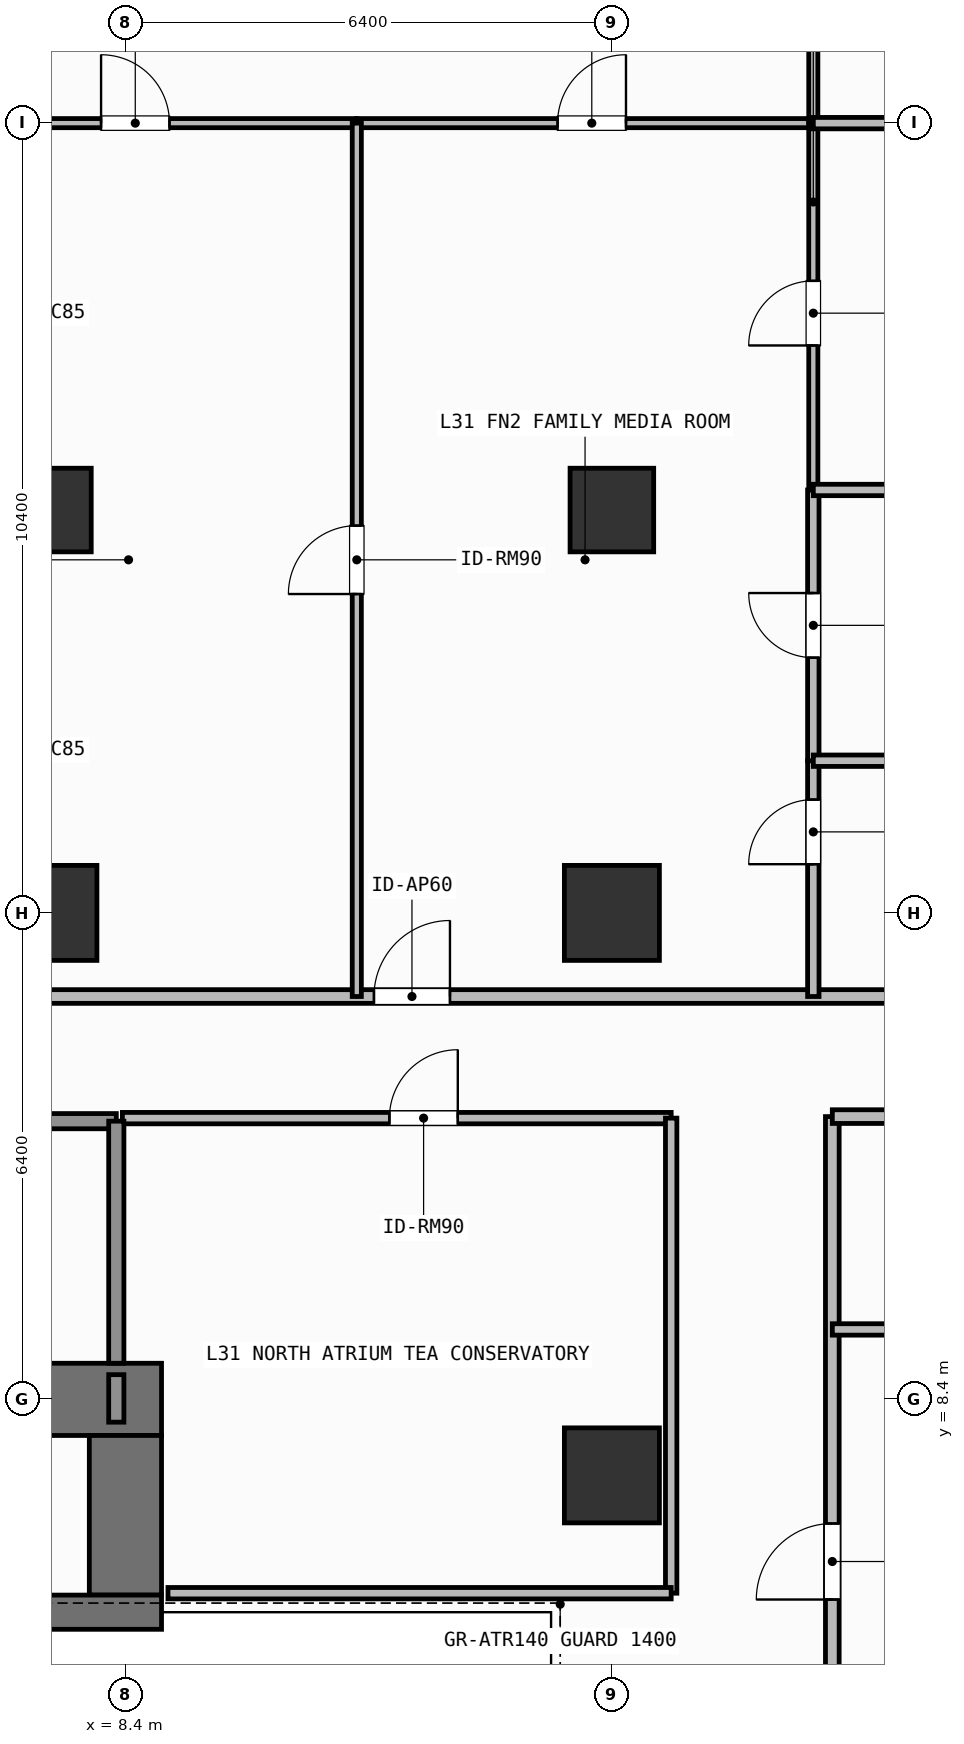
"""IFC4 building model, lengths in metres.
Left out: names, types, materials, properties, quantities, classifications, styles, units other than length and angle.
Written with IfcOpenShell. Run it as: python <this file> out.ifc"""

import sys

from ifc_helpers import new_model, si_unit, direction, frame, frame_2d, origin, origin_2d, place, context, subcontext, project, spatial, rectangle, extrude, element, fill, save


model = new_model("IFC4")
c1 = context("Model", 3, precision=1e-05, world=origin(), true_north=direction((0.0, 1.0)))
c2 = subcontext(c1, "Body", "Model", "MODEL_VIEW")
j1 = project(units=[si_unit("LENGTHUNIT", "METRE"), si_unit("PLANEANGLEUNIT", "RADIAN")], contexts=[c1])
p1 = place(None, origin())
s1 = spatial("IfcSite", under=j1, at=p1, CompositionType="ELEMENT")
p2 = place(p1, origin())
s2 = spatial("IfcBuilding", under=s1, at=p2, CompositionType="ELEMENT")
p3 = place(p2, frame((0.0, 0.0, 125.1)))
s3 = spatial("IfcBuildingStorey", under=s2, at=p3, CompositionType="ELEMENT", Elevation=125.1)
p4 = place(p3, frame((-7.55, 8.4, 0.0), z_axis=(0.0, 0.0, 1.0), x_axis=(1.0, 0.0, 0.0)))
e1 = element("IfcWall", 1, at=p4, inside=s3, PredefinedType="SHEAR", context=c2, shape_type="SweptSolid", body=[
    extrude(rectangle(XDim=16.425, YDim=0.95, at=frame_2d((8.212, 0.0))), origin(), (0.0, 0.0, 1.0), 3.9),
])
p5 = place(p3, frame((8.4, 5.825, 0.0), z_axis=(0.0, 0.0, 1.0), x_axis=(0.0, 1.0, 0.0)))
e2 = element("IfcWall", 2, at=p5, inside=s3, PredefinedType="SHEAR", context=c2, shape_type="SweptSolid", body=[
    extrude(rectangle(XDim=2.1, YDim=0.95, at=frame_2d((1.05, 0.0))), origin(), (0.0, 0.0, 1.0), 3.9),
])
p6 = place(p3, frame((3.045, 5.6, 0.0), z_axis=(0.0, 0.0, 1.0), x_axis=(1.0, 0.0, 0.0)))
e3 = element("IfcWall", 3, at=p6, inside=s3, PredefinedType="SHEAR", context=c2, shape_type="SweptSolid", body=[
    extrude(rectangle(XDim=5.83, YDim=0.45, at=frame_2d((2.915, 0.0))), origin(), (0.0, 0.0, 1.0), 3.9),
])
for number, where, z_axis, x_axis in (
    (4, (7.4, 14.8, 0.0), (0.0, 0.0, 1.0), (1.0, 0.0, 0.0)),
    (5, (14.8, 14.8, 0.0), (0.0, 0.0, 1.0), (1.0, 0.0, 0.0)),
    (6, (14.8, 7.4, 0.0), (0.0, 0.0, 1.0), (1.0, 0.0, 0.0)),
):
    element("IfcColumn", number, at=place(p3, frame(where, z_axis=z_axis, x_axis=x_axis)), inside=s3, PredefinedType="COLUMN", context=c2, shape_type="SweptSolid", body=[
        extrude(rectangle(XDim=1.25, YDim=1.25, at=origin_2d()), origin(), (0.0, 0.0, 1.0), 3.9),
    ])
for number, where, z_axis, x_axis in (
    (7, (7.4, 20.1, 0.0), (0.0, 0.0, 1.0), (1.0, 0.0, 0.0)),
    (8, (14.8, 20.1, 0.0), (0.0, 0.0, 1.0), (1.0, 0.0, 0.0)),
):
    element("IfcColumn", number, at=place(p3, frame(where, z_axis=z_axis, x_axis=x_axis)), inside=s3, PredefinedType="COLUMN", context=c2, shape_type="SweptSolid", body=[
        extrude(rectangle(XDim=1.1, YDim=1.1, at=origin_2d()), origin(), (0.0, 0.0, 1.0), 3.9),
    ])
p7 = place(p3, frame((4.58, 12.06, 0.0), z_axis=(0.0, 0.0, 1.0), x_axis=(1.0, 0.0, 0.0)))
e9 = element("IfcWall", 9, at=p7, inside=s3, PredefinedType="SOLIDWALL", context=c2, shape_type="SweptSolid", body=[
    extrude(rectangle(XDim=3.7, YDim=0.2, at=frame_2d((1.85, 0.0))), origin(), (0.0, 0.0, 1.0), 3.68),
])
p8 = place(p7, frame((1.212, 0.0, 0.0)))
e10 = element("IfcOpeningElement", 10, at=p8, cuts=e9, PredefinedType="OPENING", context=c2, shape_type="SweptSolid", body=[
    extrude(rectangle(XDim=1.1, YDim=2.15, at=frame_2d((0.55, 1.075))), frame((0.0, 0.11, 0.0), z_axis=(0.0, -1.0, 0.0), x_axis=(1.0, 0.0, 0.0)), (0.0, 0.0, 1.0), 0.22),
])
p9 = place(p3, frame((8.36, 12.1, 0.0), z_axis=(0.0, 0.0, 1.0), x_axis=(1.0, 0.0, 0.0)))
e11 = element("IfcWall", 11, at=p9, inside=s3, PredefinedType="PARTITIONING", context=c2, shape_type="SweptSolid", body=[
    extrude(rectangle(XDim=7.22, YDim=0.15, at=frame_2d((3.61, 0.0))), origin(), (0.0, 0.0, 1.0), 3.68),
])
p10 = place(p9, frame((3.513, 0.0, 0.0)))
e12 = element("IfcOpeningElement", 12, at=p10, cuts=e11, PredefinedType="OPENING", context=c2, shape_type="SweptSolid", body=[
    extrude(rectangle(XDim=0.9, YDim=2.1, at=frame_2d((0.45, 1.05))), frame((0.0, 0.085, 0.0), z_axis=(0.0, -1.0, 0.0), x_axis=(1.0, 0.0, 0.0)), (0.0, 0.0, 1.0), 0.17),
])
p11 = place(p3, frame((1.474, 13.7, 0.0), z_axis=(0.0, 0.0, 1.0), x_axis=(1.0, 0.0, 0.0)))
e13 = element("IfcWall", 13, at=p11, inside=s3, PredefinedType="PARTITIONING", context=c2, shape_type="SweptSolid", body=[
    extrude(rectangle(XDim=22.646, YDim=0.18, at=frame_2d((11.323, 0.0))), origin(), (0.0, 0.0, 1.0), 3.68),
])
p12 = place(p11, frame((10.196, 0.0, 0.0)))
e14 = element("IfcOpeningElement", 14, at=p12, cuts=e13, PredefinedType="OPENING", context=c2, shape_type="SweptSolid", body=[
    extrude(rectangle(XDim=1.0, YDim=2.2, at=frame_2d((0.5, 1.1))), frame((0.0, 0.1, 0.0), z_axis=(0.0, -1.0, 0.0), x_axis=(1.0, 0.0, 0.0)), (0.0, 0.0, 1.0), 0.2),
])
p13 = place(p3, frame((5.438, 25.19, 0.0), z_axis=(0.0, 0.0, 1.0), x_axis=(1.0, 0.0, 0.0)))
e15 = element("IfcWall", 15, at=p13, inside=s3, PredefinedType="PARTITIONING", context=c2, shape_type="SweptSolid", body=[
    extrude(rectangle(XDim=6.006, YDim=0.12, at=frame_2d((3.003, 0.0))), origin(), (0.0, 0.0, 1.0), 3.68),
])
p14 = place(p13, frame((2.642, 0.0, 0.0)))
e16 = element("IfcOpeningElement", 16, at=p14, cuts=e15, PredefinedType="OPENING", context=c2, shape_type="SweptSolid", body=[
    extrude(rectangle(XDim=0.9, YDim=2.1, at=frame_2d((0.45, 1.05))), frame((0.0, 0.07, 0.0), z_axis=(0.0, -1.0, 0.0), x_axis=(1.0, 0.0, 0.0)), (0.0, 0.0, 1.0), 0.14),
])
p15 = place(p3, frame((11.444, 25.19, 0.0), z_axis=(0.0, 0.0, 1.0), x_axis=(1.0, 0.0, 0.0)))
e17 = element("IfcWall", 17, at=p15, inside=s3, PredefinedType="PARTITIONING", context=c2, shape_type="SweptSolid", body=[
    extrude(rectangle(XDim=6.006, YDim=0.12, at=frame_2d((3.003, 0.0))), origin(), (0.0, 0.0, 1.0), 3.68),
])
p16 = place(p15, frame((2.642, 0.0, 0.0)))
e18 = element("IfcOpeningElement", 18, at=p16, cuts=e17, PredefinedType="OPENING", context=c2, shape_type="SweptSolid", body=[
    extrude(rectangle(XDim=0.9, YDim=2.1, at=frame_2d((0.45, 1.05))), frame((0.0, 0.07, 0.0), z_axis=(0.0, -1.0, 0.0), x_axis=(1.0, 0.0, 0.0)), (0.0, 0.0, 1.0), 0.14),
])
p17 = place(p3, frame((11.444, 13.7, 0.0), z_axis=(0.0, 0.0, 1.0), x_axis=(0.0, 1.0, 0.0)))
e19 = element("IfcWall", 19, at=p17, inside=s3, PredefinedType="PARTITIONING", context=c2, shape_type="SweptSolid", body=[
    extrude(rectangle(XDim=11.49, YDim=0.12, at=frame_2d((5.745, 0.0))), origin(), (0.0, 0.0, 1.0), 3.68),
])
p18 = place(p17, frame((5.295, 0.0, 0.0)))
e20 = element("IfcOpeningElement", 20, at=p18, cuts=e19, PredefinedType="OPENING", context=c2, shape_type="SweptSolid", body=[
    extrude(rectangle(XDim=0.9, YDim=2.1, at=frame_2d((0.45, 1.05))), frame((0.0, 0.07, 0.0), z_axis=(0.0, -1.0, 0.0), x_axis=(1.0, 0.0, 0.0)), (0.0, 0.0, 1.0), 0.14),
])
p19 = place(p3, frame((17.45, 13.7, 0.0), z_axis=(0.0, 0.0, 1.0), x_axis=(0.0, 1.0, 0.0)))
e21 = element("IfcWall", 21, at=p19, inside=s3, PredefinedType="PARTITIONING", context=c2, shape_type="SweptSolid", body=[
    extrude(rectangle(XDim=3.102, YDim=0.15, at=frame_2d((1.551, 0.0))), origin(), (0.0, 0.0, 1.0), 3.68),
])
p20 = place(p19, frame((1.741, 0.0, 0.0)))
e22 = element("IfcOpeningElement", 22, at=p20, cuts=e21, PredefinedType="OPENING", context=c2, shape_type="SweptSolid", body=[
    extrude(rectangle(XDim=0.85, YDim=2.1, at=frame_2d((0.425, 1.05))), frame((0.0, 0.085, 0.0), z_axis=(0.0, -1.0, 0.0), x_axis=(1.0, 0.0, 0.0)), (0.0, 0.0, 1.0), 0.17),
])
p21 = place(p3, frame((17.45, 16.802, 0.0), z_axis=(0.0, 0.0, 1.0), x_axis=(0.0, 1.0, 0.0)))
e23 = element("IfcWall", 23, at=p21, inside=s3, PredefinedType="PARTITIONING", context=c2, shape_type="SweptSolid", body=[
    extrude(rectangle(XDim=3.562, YDim=0.15, at=frame_2d((1.781, 0.0))), origin(), (0.0, 0.0, 1.0), 3.68),
])
p22 = place(p21, frame((1.356, 0.0, 0.0)))
e24 = element("IfcOpeningElement", 24, at=p22, cuts=e23, PredefinedType="OPENING", context=c2, shape_type="SweptSolid", body=[
    extrude(rectangle(XDim=0.85, YDim=2.1, at=frame_2d((0.425, 1.05))), frame((0.0, 0.085, 0.0), z_axis=(0.0, -1.0, 0.0), x_axis=(1.0, 0.0, 0.0)), (0.0, 0.0, 1.0), 0.17),
])
p23 = place(p3, frame((17.45, 20.364, 0.0), z_axis=(0.0, 0.0, 1.0), x_axis=(0.0, 1.0, 0.0)))
e25 = element("IfcWall", 25, at=p23, inside=s3, PredefinedType="PARTITIONING", context=c2, shape_type="SweptSolid", body=[
    extrude(rectangle(XDim=4.826, YDim=0.12, at=frame_2d((2.413, 0.0))), origin(), (0.0, 0.0, 1.0), 3.68),
])
p24 = place(p23, frame((1.901, 0.0, 0.0)))
e26 = element("IfcOpeningElement", 26, at=p24, cuts=e25, PredefinedType="OPENING", context=c2, shape_type="SweptSolid", body=[
    extrude(rectangle(XDim=0.85, YDim=2.1, at=frame_2d((0.425, 1.05))), frame((0.0, 0.07, 0.0), z_axis=(0.0, -1.0, 0.0), x_axis=(1.0, 0.0, 0.0)), (0.0, 0.0, 1.0), 0.14),
])
p25 = place(p3, frame((17.45, 25.19, 0.0), z_axis=(0.0, 0.0, 1.0), x_axis=(0.0, 1.0, 0.0)))
e27 = element("IfcWall", 27, at=p25, inside=s3, PredefinedType="PARTITIONING", context=c2, shape_type="SweptSolid", body=[
    extrude(rectangle(XDim=4.24, YDim=0.12, at=frame_2d((2.12, 0.0))), origin(), (0.0, 0.0, 1.0), 3.68),
])
p26 = place(p25, frame((1.581, 0.0, 0.0)))
e28 = element("IfcOpeningElement", 28, at=p26, cuts=e27, PredefinedType="OPENING", context=c2, shape_type="SweptSolid", body=[
    extrude(rectangle(XDim=0.9, YDim=2.1, at=frame_2d((0.45, 1.05))), frame((0.0, 0.07, 0.0), z_axis=(0.0, -1.0, 0.0), x_axis=(1.0, 0.0, 0.0)), (0.0, 0.0, 1.0), 0.14),
])
p27 = place(p3, frame((17.7, 1.309, 0.0), z_axis=(0.0, 0.0, 1.0), x_axis=(0.0, 1.0, 0.0)))
e29 = element("IfcWall", 29, at=p27, inside=s3, PredefinedType="PARTITIONING", context=c2, shape_type="SweptSolid", body=[
    extrude(rectangle(XDim=10.811, YDim=0.18, at=frame_2d((5.406, 0.0))), origin(), (0.0, 0.0, 1.0), 3.68),
])
p28 = place(p27, frame((4.458, 0.0, 0.0)))
e30 = element("IfcOpeningElement", 30, at=p28, cuts=e29, PredefinedType="OPENING", context=c2, shape_type="SweptSolid", body=[
    extrude(rectangle(XDim=1.0, YDim=2.2, at=frame_2d((0.5, 1.1))), frame((0.0, 0.1, 0.0), z_axis=(0.0, -1.0, 0.0), x_axis=(1.0, 0.0, 0.0)), (0.0, 0.0, 1.0), 0.2),
])
p29 = place(p3, frame((17.7, 9.32, 0.0), z_axis=(0.0, 0.0, 1.0), x_axis=(1.0, 0.0, 0.0)))
e31 = element("IfcWall", 31, at=p29, inside=s3, PredefinedType="PARTITIONING", context=c2, shape_type="SweptSolid", body=[
    extrude(rectangle(XDim=5.59, YDim=0.15, at=frame_2d((2.795, 0.0))), origin(), (0.0, 0.0, 1.0), 3.68),
])
p30 = place(p29, frame((2.458, 0.0, 0.0)))
e32 = element("IfcOpeningElement", 32, at=p30, cuts=e31, PredefinedType="OPENING", context=c2, shape_type="SweptSolid", body=[
    extrude(rectangle(XDim=0.85, YDim=2.1, at=frame_2d((0.425, 1.05))), frame((0.0, 0.085, 0.0), z_axis=(0.0, -1.0, 0.0), x_axis=(1.0, 0.0, 0.0)), (0.0, 0.0, 1.0), 0.17),
])
p31 = place(p3, frame((8.28, 8.875, 0.0), z_axis=(0.0, 0.0, 1.0), x_axis=(0.0, 1.0, 0.0)))
e33 = element("IfcWall", 33, at=p31, inside=s3, PredefinedType="SOLIDWALL", context=c2, shape_type="SweptSolid", body=[
    extrude(rectangle(XDim=3.185, YDim=0.2, at=frame_2d((1.593, 0.0))), origin(), (0.0, 0.0, 1.0), 3.68),
])
p32 = place(p3, frame((8.28, 8.1, 0.0), z_axis=(0.0, 0.0, 1.0), x_axis=(0.0, 1.0, 0.0)))
e34 = element("IfcWall", 34, at=p32, inside=s3, PredefinedType="SOLIDWALL", context=c2, shape_type="SweptSolid", body=[
    extrude(rectangle(XDim=0.625, YDim=0.2, at=frame_2d((0.312, 0.0))), origin(), (0.0, 0.0, 1.0), 3.68),
])
p33 = place(p3, frame((15.58, 5.85, 0.0), z_axis=(0.0, 0.0, 1.0), x_axis=(0.0, 1.0, 0.0)))
e35 = element("IfcWall", 35, at=p33, inside=s3, PredefinedType="PARTITIONING", context=c2, shape_type="SweptSolid", body=[
    extrude(rectangle(XDim=6.25, YDim=0.15, at=frame_2d((3.125, 0.0))), origin(), (0.0, 0.0, 1.0), 3.68),
])
p34 = place(p3, frame((8.96, 5.85, 0.0), z_axis=(0.0, 0.0, 1.0), x_axis=(1.0, 0.0, 0.0)))
e36 = element("IfcWall", 36, at=p34, inside=s3, PredefinedType="PARTITIONING", context=c2, shape_type="SweptSolid", body=[
    extrude(rectangle(XDim=6.62, YDim=0.15, at=frame_2d((3.31, 0.0))), origin(), (0.0, 0.0, 1.0), 3.68),
])
for number, where, z_axis, x_axis in (
    (37, (17.45, 16.802, 0.0), (0.0, 0.0, 1.0), (1.0, 0.0, 0.0)),
    (38, (17.45, 20.364, 0.0), (0.0, 0.0, 1.0), (1.0, 0.0, 0.0)),
    (39, (17.45, 25.19, 0.0), (0.0, 0.0, 1.0), (1.0, 0.0, 0.0)),
):
    element("IfcWall", number, at=place(p3, frame(where, z_axis=z_axis, x_axis=x_axis)), inside=s3, PredefinedType="PARTITIONING", context=c2, shape_type="SweptSolid", body=[
        extrude(rectangle(XDim=6.67, YDim=0.15, at=frame_2d((3.335, 0.0))), origin(), (0.0, 0.0, 1.0), 3.68),
    ])
p35 = place(p3, frame((17.7, 12.12, 0.0), z_axis=(0.0, 0.0, 1.0), x_axis=(1.0, 0.0, 0.0)))
e40 = element("IfcWall", 40, at=p35, inside=s3, PredefinedType="PARTITIONING", context=c2, shape_type="SweptSolid", body=[
    extrude(rectangle(XDim=9.83, YDim=0.18, at=frame_2d((4.915, 0.0))), origin(), (0.0, 0.0, 1.0), 3.68),
])
p36 = place(p10, origin())
e41 = element("IfcDoor", 41, at=p36, inside=s3, OperationType="SINGLE_SWING_RIGHT", PredefinedType="DOOR", context=c2, shape_type="SweptSolid", body=[
    extrude(rectangle(XDim=0.9, YDim=2.1, at=frame_2d((0.45, 1.05))), frame((0.0, 0.025, 0.0), z_axis=(0.0, -1.0, 0.0), x_axis=(1.0, 0.0, 0.0)), (0.0, 0.0, 1.0), 0.05),
])
fill(e12, e41)
p37 = place(p12, origin())
e42 = element("IfcDoor", 42, at=p37, inside=s3, OperationType="SINGLE_SWING_RIGHT", PredefinedType="DOOR", context=c2, shape_type="SweptSolid", body=[
    extrude(rectangle(XDim=1.0, YDim=2.2, at=frame_2d((0.5, 1.1))), frame((0.0, 0.025, 0.0), z_axis=(0.0, -1.0, 0.0), x_axis=(1.0, 0.0, 0.0)), (0.0, 0.0, 1.0), 0.05),
])
fill(e14, e42)
p38 = place(p14, origin())
e43 = element("IfcDoor", 43, at=p38, inside=s3, OperationType="SINGLE_SWING_LEFT", PredefinedType="DOOR", context=c2, shape_type="SweptSolid", body=[
    extrude(rectangle(XDim=0.9, YDim=2.1, at=frame_2d((0.45, 1.05))), frame((0.0, 0.025, 0.0), z_axis=(0.0, -1.0, 0.0), x_axis=(1.0, 0.0, 0.0)), (0.0, 0.0, 1.0), 0.05),
])
fill(e16, e43)
p39 = place(p16, origin())
e44 = element("IfcDoor", 44, at=p39, inside=s3, OperationType="SINGLE_SWING_RIGHT", PredefinedType="DOOR", context=c2, shape_type="SweptSolid", body=[
    extrude(rectangle(XDim=0.9, YDim=2.1, at=frame_2d((0.45, 1.05))), frame((0.0, 0.025, 0.0), z_axis=(0.0, -1.0, 0.0), x_axis=(1.0, 0.0, 0.0)), (0.0, 0.0, 1.0), 0.05),
])
fill(e18, e44)
p40 = place(p18, origin())
e45 = element("IfcDoor", 45, at=p40, inside=s3, OperationType="SINGLE_SWING_LEFT", PredefinedType="DOOR", context=c2, shape_type="SweptSolid", body=[
    extrude(rectangle(XDim=0.9, YDim=2.1, at=frame_2d((0.45, 1.05))), frame((0.0, 0.025, 0.0), z_axis=(0.0, -1.0, 0.0), x_axis=(1.0, 0.0, 0.0)), (0.0, 0.0, 1.0), 0.05),
])
fill(e20, e45)
p41 = place(p20, origin())
e46 = element("IfcDoor", 46, at=p41, inside=s3, OperationType="SINGLE_SWING_LEFT", PredefinedType="DOOR", context=c2, shape_type="SweptSolid", body=[
    extrude(rectangle(XDim=0.85, YDim=2.1, at=frame_2d((0.425, 1.05))), frame((0.0, 0.025, 0.0), z_axis=(0.0, -1.0, 0.0), x_axis=(1.0, 0.0, 0.0)), (0.0, 0.0, 1.0), 0.05),
])
fill(e22, e46)
p42 = place(p22, origin())
e47 = element("IfcDoor", 47, at=p42, inside=s3, OperationType="SINGLE_SWING_RIGHT", PredefinedType="DOOR", context=c2, shape_type="SweptSolid", body=[
    extrude(rectangle(XDim=0.85, YDim=2.1, at=frame_2d((0.425, 1.05))), frame((0.0, 0.025, 0.0), z_axis=(0.0, -1.0, 0.0), x_axis=(1.0, 0.0, 0.0)), (0.0, 0.0, 1.0), 0.05),
])
fill(e24, e47)
p43 = place(p24, origin())
e48 = element("IfcDoor", 48, at=p43, inside=s3, OperationType="SINGLE_SWING_LEFT", PredefinedType="DOOR", context=c2, shape_type="SweptSolid", body=[
    extrude(rectangle(XDim=0.85, YDim=2.1, at=frame_2d((0.425, 1.05))), frame((0.0, 0.025, 0.0), z_axis=(0.0, -1.0, 0.0), x_axis=(1.0, 0.0, 0.0)), (0.0, 0.0, 1.0), 0.05),
])
fill(e26, e48)
p44 = place(p28, origin())
e49 = element("IfcDoor", 49, at=p44, inside=s3, OperationType="SINGLE_SWING_LEFT", PredefinedType="DOOR", context=c2, shape_type="SweptSolid", body=[
    extrude(rectangle(XDim=1.0, YDim=2.2, at=frame_2d((0.5, 1.1))), frame((0.0, 0.025, 0.0), z_axis=(0.0, -1.0, 0.0), x_axis=(1.0, 0.0, 0.0)), (0.0, 0.0, 1.0), 0.05),
])
fill(e30, e49)
save(model, sys.argv[1])
